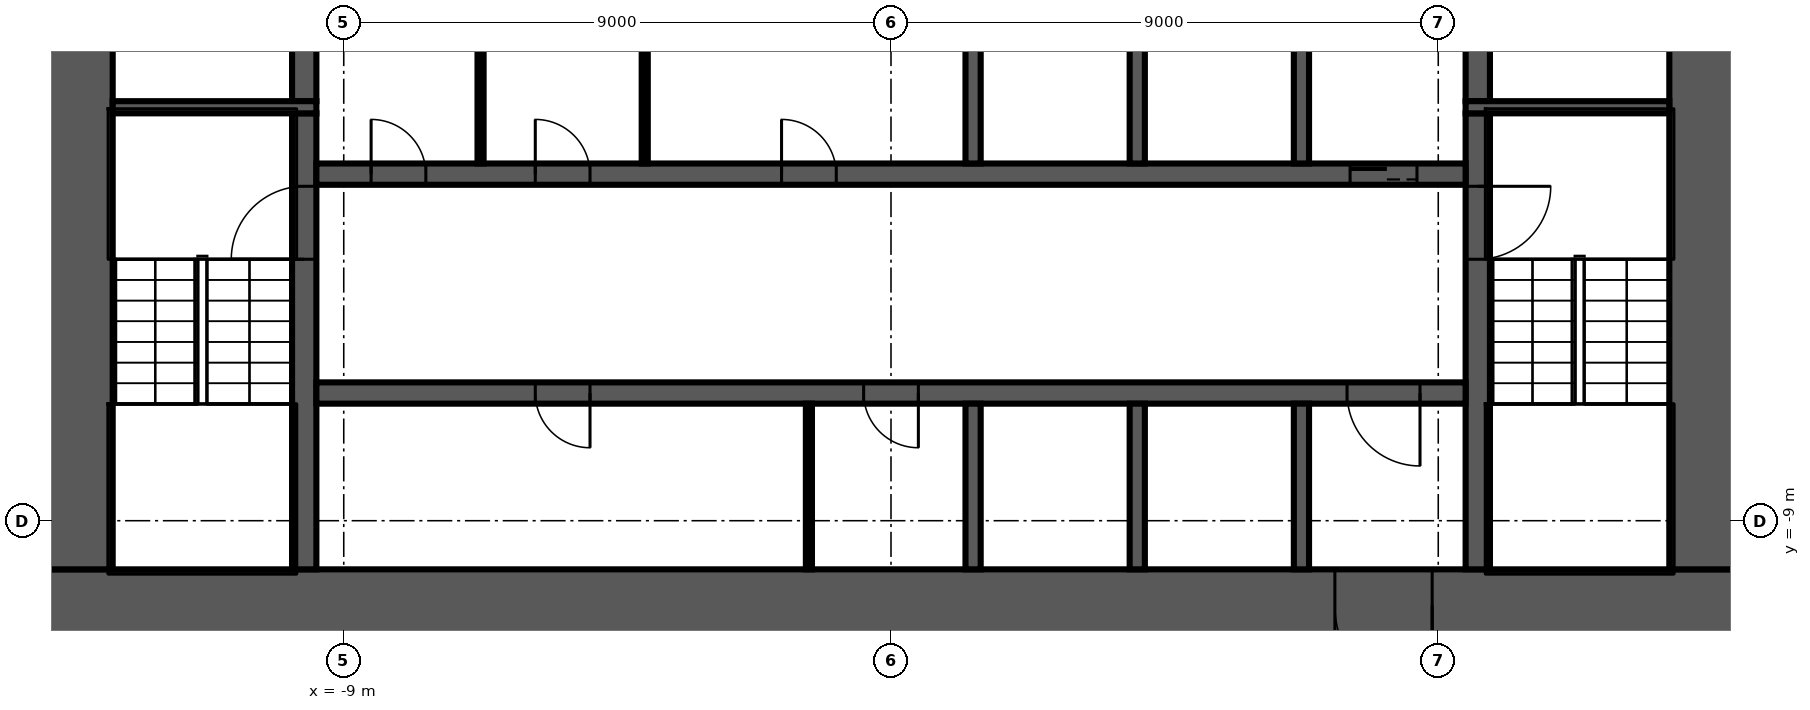
"""IFC4 building model, lengths in metres.
Left out: names, types, materials, properties, quantities, classifications, styles, units other than length and angle.
Written with IfcOpenShell. Run it as: python <this file> out.ifc"""

import sys

from ifc_helpers import new_model, si_unit, direction, frame, frame_2d, origin, place, context, subcontext, project, spatial, rectangle, extrude, element, fill, save


model = new_model("IFC4")
c1 = context("Model", 3, precision=1e-05, world=origin(), true_north=direction((0.0, 1.0)))
c2 = subcontext(c1, "Body", "Model", "MODEL_VIEW")
j1 = project(units=[si_unit("LENGTHUNIT", "METRE"), si_unit("PLANEANGLEUNIT", "RADIAN")], contexts=[c1])
p1 = place(None, origin())
s1 = spatial("IfcSite", under=j1, at=p1, CompositionType="ELEMENT")
p2 = place(p1, origin())
s2 = spatial("IfcBuilding", under=s1, at=p2, CompositionType="ELEMENT")
p3 = place(p2, frame((0.0, 0.0, -11.5)))
s3 = spatial("IfcBuildingStorey", under=s2, at=p3, CompositionType="ELEMENT", Elevation=-11.5)
p4 = place(p3, frame((14.0, -10.4, 0.0), z_axis=(0.0, 0.0, 1.0), x_axis=(-1.0, 0.0, 0.0)))
e1 = element("IfcWall", 1, at=p4, inside=s3, PredefinedType="SHEAR", context=c2, shape_type="SweptSolid", body=[
    extrude(rectangle(XDim=28.0, YDim=1.2, at=frame_2d((14.0, 0.0))), origin(), (0.0, 0.0, 1.0), 5.1),
])
p5 = place(p4, frame((5.1, 0.0, 0.0)))
e2 = element("IfcOpeningElement", 2, at=p5, cuts=e1, PredefinedType="OPENING", context=c2, shape_type="SweptSolid", body=[
    extrude(rectangle(XDim=1.6, YDim=2.1, at=frame_2d((0.8, 1.05))), frame((0.0, 0.61, 0.0), z_axis=(0.0, -1.0, 0.0), x_axis=(1.0, 0.0, 0.0)), (0.0, 0.0, 1.0), 1.22),
])
for number, where, z_axis, x_axis in (
    (3, (13.4, 9.8, 0.0), (0.0, 0.0, 1.0), (0.0, -1.0, 0.0)),
    (4, (-13.4, -9.8, 0.0), (0.0, 0.0, 1.0), (0.0, 1.0, 0.0)),
):
    element("IfcWall", number, at=place(p3, frame(where, z_axis=z_axis, x_axis=x_axis)), inside=s3, PredefinedType="SHEAR", context=c2, shape_type="SweptSolid", body=[
        extrude(rectangle(XDim=19.6, YDim=1.2, at=frame_2d((9.8, 0.0))), origin(), (0.0, 0.0, 1.0), 5.1),
    ])
p6 = place(p3, frame((9.65, -2.3, 0.0), z_axis=(0.0, 0.0, 1.0), x_axis=(0.0, -1.0, 0.0)))
e5 = element("IfcWall", 5, at=p6, inside=s3, PredefinedType="SHEAR", context=c2, shape_type="SweptSolid", body=[
    extrude(rectangle(XDim=7.5, YDim=0.4, at=frame_2d((3.75, 0.0))), origin(), (0.0, 0.0, 1.0), 5.1),
])
p7 = place(p6, frame((1.2, 0.0, 0.0)))
e6 = element("IfcOpeningElement", 6, at=p7, cuts=e5, PredefinedType="OPENING", context=c2, shape_type="SweptSolid", body=[
    extrude(rectangle(XDim=1.2, YDim=2.1, at=frame_2d((0.6, 1.05))), frame((0.0, 0.21, 0.0), z_axis=(0.0, -1.0, 0.0), x_axis=(1.0, 0.0, 0.0)), (0.0, 0.0, 1.0), 0.42),
])
p8 = place(p3, frame((9.65, 2.1, 0.0), z_axis=(0.0, 0.0, 1.0), x_axis=(0.0, -1.0, 0.0)))
e7 = element("IfcWall", 7, at=p8, inside=s3, PredefinedType="SHEAR", context=c2, shape_type="SweptSolid", body=[
    extrude(rectangle(XDim=4.2, YDim=0.4, at=frame_2d((2.1, 0.0))), origin(), (0.0, 0.0, 1.0), 5.1),
])
p9 = place(p8, frame((0.15, 0.0, 0.0)))
e8 = element("IfcOpeningElement", 8, at=p9, cuts=e7, PredefinedType="OPENING", context=c2, shape_type="SweptSolid", body=[
    extrude(rectangle(XDim=0.9, YDim=2.1, at=frame_2d((0.45, 1.05))), frame((0.0, 0.21, 0.0), z_axis=(0.0, -1.0, 0.0), x_axis=(1.0, 0.0, 0.0)), (0.0, 0.0, 1.0), 0.42),
])
p10 = place(p3, frame((-9.65, -9.8, 0.0), z_axis=(0.0, 0.0, 1.0), x_axis=(0.0, 1.0, 0.0)))
e9 = element("IfcWall", 9, at=p10, inside=s3, PredefinedType="SHEAR", context=c2, shape_type="SweptSolid", body=[
    extrude(rectangle(XDim=7.5, YDim=0.4, at=frame_2d((3.75, 0.0))), origin(), (0.0, 0.0, 1.0), 5.1),
])
p11 = place(p10, frame((5.1, 0.0, 0.0)))
e10 = element("IfcOpeningElement", 10, at=p11, cuts=e9, PredefinedType="OPENING", context=c2, shape_type="SweptSolid", body=[
    extrude(rectangle(XDim=1.2, YDim=2.1, at=frame_2d((0.6, 1.05))), frame((0.0, 0.21, 0.0), z_axis=(0.0, -1.0, 0.0), x_axis=(1.0, 0.0, 0.0)), (0.0, 0.0, 1.0), 0.42),
])
p12 = place(p3, frame((-9.65, -2.1, 0.0), z_axis=(0.0, 0.0, 1.0), x_axis=(0.0, 1.0, 0.0)))
e11 = element("IfcWall", 11, at=p12, inside=s3, PredefinedType="SHEAR", context=c2, shape_type="SweptSolid", body=[
    extrude(rectangle(XDim=4.2, YDim=0.4, at=frame_2d((2.1, 0.0))), origin(), (0.0, 0.0, 1.0), 5.1),
])
for number, where, z_axis, x_axis in (
    (12, (9.45, -2.2, 0.0), (0.0, 0.0, 1.0), (1.0, 0.0, 0.0)),
    (13, (-9.45, -2.2, 0.0), (0.0, 0.0, 1.0), (-1.0, 0.0, 0.0)),
):
    element("IfcWall", number, at=place(p3, frame(where, z_axis=z_axis, x_axis=x_axis)), inside=s3, PredefinedType="SHEAR", context=c2, shape_type="SweptSolid", body=[
        extrude(rectangle(XDim=3.35, YDim=0.2, at=frame_2d((1.675, 0.0))), origin(), (0.0, 0.0, 1.0), 5.1),
    ])
p13 = place(p3, frame((-9.45, -3.3, 0.0), z_axis=(0.0, 0.0, 1.0), x_axis=(1.0, 0.0, 0.0)))
e14 = element("IfcWall", 14, at=p13, inside=s3, PredefinedType="SHEAR", context=c2, shape_type="SweptSolid", body=[
    extrude(rectangle(XDim=18.9, YDim=0.35, at=frame_2d((9.45, 0.0))), origin(), (0.0, 0.0, 1.0), 5.1),
])
p14 = place(p13, frame((17.0, 0.0, 0.0)))
e15 = element("IfcOpeningElement", 15, at=p14, cuts=e14, PredefinedType="OPENING", context=c2, shape_type="SweptSolid", body=[
    extrude(rectangle(XDim=1.1, YDim=2.1, at=frame_2d((0.55, 1.05))), frame((0.0, 0.185, 0.0), z_axis=(0.0, -1.0, 0.0), x_axis=(1.0, 0.0, 0.0)), (0.0, 0.0, 1.0), 0.37),
])
p15 = place(p13, frame((0.9, 0.0, 0.0)))
e16 = element("IfcOpeningElement", 16, at=p15, cuts=e14, PredefinedType="OPENING", context=c2, shape_type="SweptSolid", body=[
    extrude(rectangle(XDim=0.9, YDim=2.1, at=frame_2d((0.45, 1.05))), frame((0.0, 0.185, 0.0), z_axis=(0.0, -1.0, 0.0), x_axis=(1.0, 0.0, 0.0)), (0.0, 0.0, 1.0), 0.37),
])
p16 = place(p13, frame((3.6, 0.0, 0.0)))
e17 = element("IfcOpeningElement", 17, at=p16, cuts=e14, PredefinedType="OPENING", context=c2, shape_type="SweptSolid", body=[
    extrude(rectangle(XDim=0.9, YDim=2.1, at=frame_2d((0.45, 1.05))), frame((0.0, 0.185, 0.0), z_axis=(0.0, -1.0, 0.0), x_axis=(1.0, 0.0, 0.0)), (0.0, 0.0, 1.0), 0.37),
])
p17 = place(p13, frame((7.65, 0.0, 0.0)))
e18 = element("IfcOpeningElement", 18, at=p17, cuts=e14, PredefinedType="OPENING", context=c2, shape_type="SweptSolid", body=[
    extrude(rectangle(XDim=0.9, YDim=2.1, at=frame_2d((0.45, 1.05))), frame((0.0, 0.185, 0.0), z_axis=(0.0, -1.0, 0.0), x_axis=(1.0, 0.0, 0.0)), (0.0, 0.0, 1.0), 0.37),
])
p18 = place(p3, frame((9.45, -6.9, 0.0), z_axis=(0.0, 0.0, 1.0), x_axis=(-1.0, 0.0, 0.0)))
e19 = element("IfcWall", 19, at=p18, inside=s3, PredefinedType="SHEAR", context=c2, shape_type="SweptSolid", body=[
    extrude(rectangle(XDim=18.9, YDim=0.35, at=frame_2d((9.45, 0.0))), origin(), (0.0, 0.0, 1.0), 5.1),
])
p19 = place(p18, frame((0.75, 0.0, 0.0)))
e20 = element("IfcOpeningElement", 20, at=p19, cuts=e19, PredefinedType="OPENING", context=c2, shape_type="SweptSolid", body=[
    extrude(rectangle(XDim=1.2, YDim=2.1, at=frame_2d((0.6, 1.05))), frame((0.0, 0.185, 0.0), z_axis=(0.0, -1.0, 0.0), x_axis=(1.0, 0.0, 0.0)), (0.0, 0.0, 1.0), 0.37),
])
p20 = place(p18, frame((14.4, 0.0, 0.0)))
e21 = element("IfcOpeningElement", 21, at=p20, cuts=e19, PredefinedType="OPENING", context=c2, shape_type="SweptSolid", body=[
    extrude(rectangle(XDim=0.9, YDim=2.1, at=frame_2d((0.45, 1.05))), frame((0.0, 0.185, 0.0), z_axis=(0.0, -1.0, 0.0), x_axis=(1.0, 0.0, 0.0)), (0.0, 0.0, 1.0), 0.37),
])
p21 = place(p18, frame((9.0, 0.0, 0.0)))
e22 = element("IfcOpeningElement", 22, at=p21, cuts=e19, PredefinedType="OPENING", context=c2, shape_type="SweptSolid", body=[
    extrude(rectangle(XDim=0.9, YDim=2.1, at=frame_2d((0.45, 1.05))), frame((0.0, 0.185, 0.0), z_axis=(0.0, -1.0, 0.0), x_axis=(1.0, 0.0, 0.0)), (0.0, 0.0, 1.0), 0.37),
])
for number, where, z_axis, x_axis in (
    (23, (6.75, -9.8, 0.0), (0.0, 0.0, 1.0), (0.0, 1.0, 0.0)),
    (24, (6.75, -3.125, 0.0), (0.0, 0.0, 1.0), (0.0, 1.0, 0.0)),
    (25, (4.05, -9.8, 0.0), (0.0, 0.0, 1.0), (0.0, 1.0, 0.0)),
    (26, (4.05, -3.125, 0.0), (0.0, 0.0, 1.0), (0.0, 1.0, 0.0)),
    (27, (1.35, -9.8, 0.0), (0.0, 0.0, 1.0), (0.0, 1.0, 0.0)),
    (28, (1.35, -3.125, 0.0), (0.0, 0.0, 1.0), (0.0, 1.0, 0.0)),
):
    element("IfcWall", number, at=place(p3, frame(where, z_axis=z_axis, x_axis=x_axis)), inside=s3, PredefinedType="SHEAR", context=c2, shape_type="SweptSolid", body=[
        extrude(rectangle(XDim=2.725, YDim=0.25, at=frame_2d((1.363, 0.0))), origin(), (0.0, 0.0, 1.0), 5.1),
    ])
for number, where, z_axis, x_axis in (
    (29, (-1.35, -9.8, 0.0), (0.0, 0.0, 1.0), (0.0, 1.0, 0.0)),
    (30, (-4.05, -3.125, 0.0), (0.0, 0.0, 1.0), (0.0, 1.0, 0.0)),
    (31, (-6.75, -3.125, 0.0), (0.0, 0.0, 1.0), (0.0, 1.0, 0.0)),
):
    element("IfcWall", number, at=place(p3, frame(where, z_axis=z_axis, x_axis=x_axis)), inside=s3, PredefinedType="PARTITIONING", context=c2, shape_type="SweptSolid", body=[
        extrude(rectangle(XDim=2.725, YDim=0.1, at=frame_2d((1.363, 0.0))), origin(), (0.0, 0.0, 1.0), 5.1),
    ])
p22 = place(p14, origin())
e32 = element("IfcDoor", 32, at=p22, inside=s3, OperationType="DOUBLE_DOOR_SLIDING", PredefinedType="DOOR", context=c2, shape_type="SweptSolid", body=[
    extrude(rectangle(XDim=1.1, YDim=2.1, at=frame_2d((0.55, 1.05))), frame((0.0, 0.025, 0.0), z_axis=(0.0, -1.0, 0.0), x_axis=(1.0, 0.0, 0.0)), (0.0, 0.0, 1.0), 0.05),
])
fill(e15, e32)
p23 = place(p5, origin())
e33 = element("IfcDoor", 33, at=p23, inside=s3, OperationType="DOUBLE_DOOR_SINGLE_SWING", PredefinedType="DOOR", context=c2, shape_type="SweptSolid", body=[
    extrude(rectangle(XDim=1.6, YDim=2.1, at=frame_2d((0.8, 1.05))), frame((0.0, 0.025, 0.0), z_axis=(0.0, -1.0, 0.0), x_axis=(1.0, 0.0, 0.0)), (0.0, 0.0, 1.0), 0.05),
])
fill(e2, e33)
p24 = place(p19, origin())
e34 = element("IfcDoor", 34, at=p24, inside=s3, OperationType="SINGLE_SWING_LEFT", PredefinedType="DOOR", context=c2, shape_type="SweptSolid", body=[
    extrude(rectangle(XDim=1.2, YDim=2.1, at=frame_2d((0.6, 1.05))), frame((0.0, 0.025, 0.0), z_axis=(0.0, -1.0, 0.0), x_axis=(1.0, 0.0, 0.0)), (0.0, 0.0, 1.0), 0.05),
])
fill(e20, e34)
p25 = place(p15, origin())
e35 = element("IfcDoor", 35, at=p25, inside=s3, OperationType="SINGLE_SWING_RIGHT", PredefinedType="DOOR", context=c2, shape_type="SweptSolid", body=[
    extrude(rectangle(XDim=0.9, YDim=2.1, at=frame_2d((0.45, 1.05))), frame((0.0, 0.025, 0.0), z_axis=(0.0, -1.0, 0.0), x_axis=(1.0, 0.0, 0.0)), (0.0, 0.0, 1.0), 0.05),
])
fill(e16, e35)
p26 = place(p16, origin())
e36 = element("IfcDoor", 36, at=p26, inside=s3, OperationType="SINGLE_SWING_LEFT", PredefinedType="DOOR", context=c2, shape_type="SweptSolid", body=[
    extrude(rectangle(XDim=0.9, YDim=2.1, at=frame_2d((0.45, 1.05))), frame((0.0, 0.025, 0.0), z_axis=(0.0, -1.0, 0.0), x_axis=(1.0, 0.0, 0.0)), (0.0, 0.0, 1.0), 0.05),
])
fill(e17, e36)
p27 = place(p17, origin())
e37 = element("IfcDoor", 37, at=p27, inside=s3, OperationType="SINGLE_SWING_RIGHT", PredefinedType="DOOR", context=c2, shape_type="SweptSolid", body=[
    extrude(rectangle(XDim=0.9, YDim=2.1, at=frame_2d((0.45, 1.05))), frame((0.0, 0.025, 0.0), z_axis=(0.0, -1.0, 0.0), x_axis=(1.0, 0.0, 0.0)), (0.0, 0.0, 1.0), 0.05),
])
fill(e18, e37)
p28 = place(p20, origin())
e38 = element("IfcDoor", 38, at=p28, inside=s3, OperationType="SINGLE_SWING_LEFT", PredefinedType="DOOR", context=c2, shape_type="SweptSolid", body=[
    extrude(rectangle(XDim=0.9, YDim=2.1, at=frame_2d((0.45, 1.05))), frame((0.0, 0.025, 0.0), z_axis=(0.0, -1.0, 0.0), x_axis=(1.0, 0.0, 0.0)), (0.0, 0.0, 1.0), 0.05),
])
fill(e21, e38)
p29 = place(p21, origin())
e39 = element("IfcDoor", 39, at=p29, inside=s3, OperationType="SINGLE_SWING_RIGHT", PredefinedType="DOOR", context=c2, shape_type="SweptSolid", body=[
    extrude(rectangle(XDim=0.9, YDim=2.1, at=frame_2d((0.45, 1.05))), frame((0.0, 0.025, 0.0), z_axis=(0.0, -1.0, 0.0), x_axis=(1.0, 0.0, 0.0)), (0.0, 0.0, 1.0), 0.05),
])
fill(e22, e39)
p30 = place(p7, origin())
e40 = element("IfcDoor", 40, at=p30, inside=s3, OperationType="SINGLE_SWING_RIGHT", PredefinedType="DOOR", context=c2, shape_type="SweptSolid", body=[
    extrude(rectangle(XDim=1.2, YDim=2.1, at=frame_2d((0.6, 1.05))), frame((0.0, 0.025, 0.0), z_axis=(0.0, -1.0, 0.0), x_axis=(1.0, 0.0, 0.0)), (0.0, 0.0, 1.0), 0.05),
])
fill(e6, e40)
p31 = place(p11, origin())
e41 = element("IfcDoor", 41, at=p31, inside=s3, OperationType="SINGLE_SWING_LEFT", PredefinedType="DOOR", context=c2, shape_type="SweptSolid", body=[
    extrude(rectangle(XDim=1.2, YDim=2.1, at=frame_2d((0.6, 1.05))), frame((0.0, 0.025, 0.0), z_axis=(0.0, -1.0, 0.0), x_axis=(1.0, 0.0, 0.0)), (0.0, 0.0, 1.0), 0.05),
])
fill(e10, e41)
save(model, sys.argv[1])
